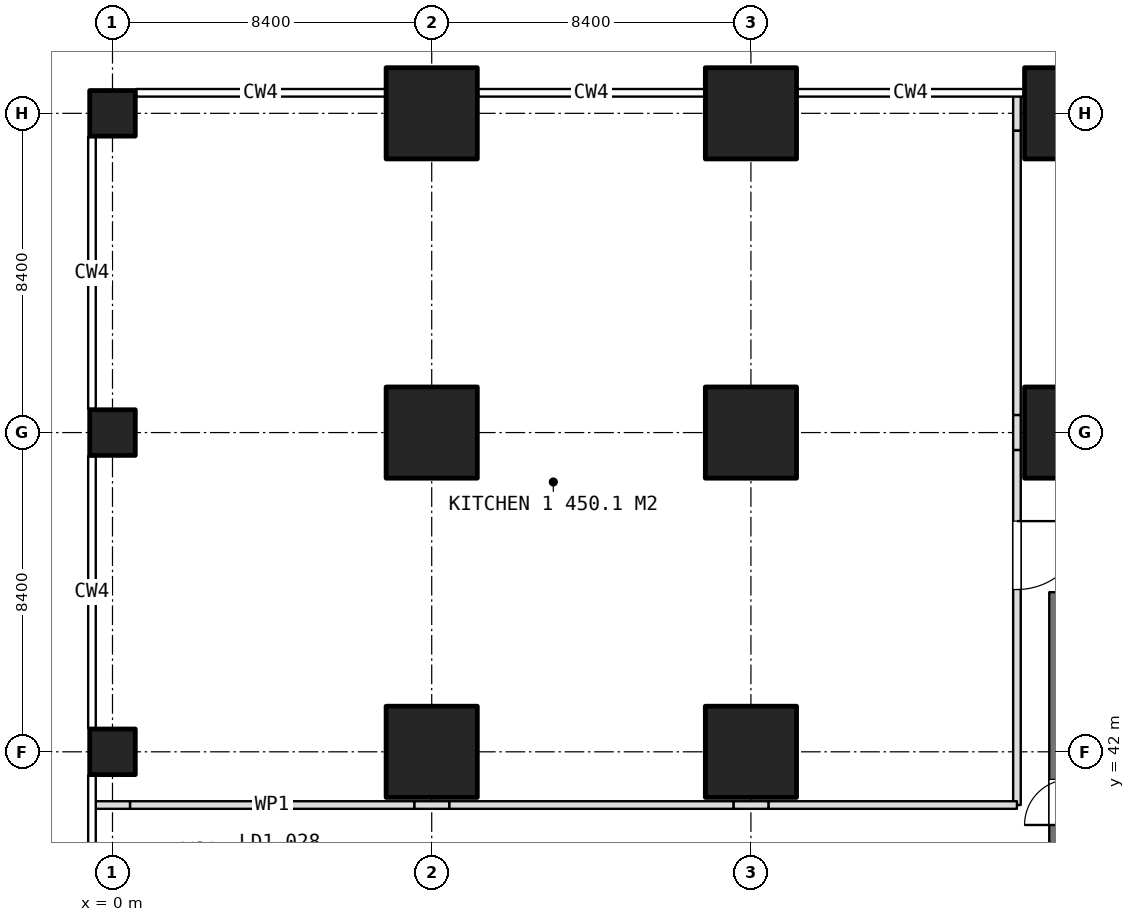
"""IFC4 building model, lengths in metres.
Left out: names, types, materials, properties, quantities, classifications, styles, units other than length and angle.
Written with IfcOpenShell. Run it as: python <this file> out.ifc"""

import sys

from ifc_helpers import new_model, si_unit, direction, frame, frame_2d, origin, origin_2d, place, context, subcontext, project, spatial, rectangle, extrude, element, fill, save


model = new_model("IFC4")
c1 = context("Model", 3, precision=1e-05, world=origin(), true_north=direction((0.0, 1.0)))
c2 = subcontext(c1, "Body", "Model", "MODEL_VIEW")
j1 = project(units=[si_unit("LENGTHUNIT", "METRE"), si_unit("PLANEANGLEUNIT", "RADIAN")], contexts=[c1])
p1 = place(None, origin())
s1 = spatial("IfcSite", under=j1, at=p1, CompositionType="ELEMENT")
p2 = place(p1, origin())
s2 = spatial("IfcBuilding", under=s1, at=p2, CompositionType="ELEMENT")
p3 = place(p2, frame((0.0, 0.0, 15.4)))
s3 = spatial("IfcBuildingStorey", under=s2, at=p3, CompositionType="ELEMENT", Elevation=15.4)
p4 = place(p3, frame((25.2, 21.0, 0.0), z_axis=(0.0, 0.0, 1.0), x_axis=(0.0, 1.0, 0.0)))
e1 = element("IfcWall", 1, at=p4, inside=s3, PredefinedType="SHEAR", context=c2, shape_type="SweptSolid", body=[
    extrude(rectangle(XDim=25.2, YDim=1.1, at=frame_2d((12.6, 0.0))), origin(), (0.0, 0.0, 1.0), 5.0),
])
p5 = place(p4, frame((7.8, 0.0, 0.0)))
e2 = element("IfcOpeningElement", 2, at=p5, cuts=e1, PredefinedType="OPENING", context=c2, shape_type="SweptSolid", body=[
    extrude(rectangle(XDim=1.2, YDim=2.1, at=frame_2d((0.6, 1.05))), frame((0.0, 0.56, 0.0), z_axis=(0.0, -1.0, 0.0), x_axis=(1.0, 0.0, 0.0)), (0.0, 0.0, 1.0), 1.12),
])
p6 = place(p4, frame((14.25, 0.0, 0.0)))
e3 = element("IfcOpeningElement", 3, at=p6, cuts=e1, PredefinedType="OPENING", context=c2, shape_type="SweptSolid", body=[
    extrude(rectangle(XDim=0.9, YDim=2.1, at=frame_2d((0.45, 1.05))), frame((0.0, 0.56, 0.0), z_axis=(0.0, -1.0, 0.0), x_axis=(1.0, 0.0, 0.0)), (0.0, 0.0, 1.0), 1.12),
])
p7 = place(p4, frame((16.85, 0.0, 0.0)))
e4 = element("IfcOpeningElement", 4, at=p7, cuts=e1, PredefinedType="OPENING", context=c2, shape_type="SweptSolid", body=[
    extrude(rectangle(XDim=0.9, YDim=2.1, at=frame_2d((0.45, 1.05))), frame((0.0, 0.56, 0.0), z_axis=(0.0, -1.0, 0.0), x_axis=(1.0, 0.0, 0.0)), (0.0, 0.0, 1.0), 1.12),
])
p8 = place(p4, frame((19.075, 0.0, 0.0)))
e5 = element("IfcOpeningElement", 5, at=p8, cuts=e1, PredefinedType="OPENING", context=c2, shape_type="SweptSolid", body=[
    extrude(rectangle(XDim=1.2, YDim=2.1, at=frame_2d((0.6, 1.05))), frame((0.0, 0.56, 0.0), z_axis=(0.0, -1.0, 0.0), x_axis=(1.0, 0.0, 0.0)), (0.0, 0.0, 1.0), 1.12),
])
for number, where, z_axis, x_axis in (
    (6, (0.0, 42.0, 0.0), (0.0, 0.0, 1.0), (1.0, 0.0, 0.0)),
    (7, (0.0, 50.4, 0.0), (0.0, 0.0, 1.0), (1.0, 0.0, 0.0)),
    (8, (0.0, 58.8, 0.0), (0.0, 0.0, 1.0), (1.0, 0.0, 0.0)),
):
    element("IfcColumn", number, at=place(p3, frame(where, z_axis=z_axis, x_axis=x_axis)), inside=s3, PredefinedType="COLUMN", context=c2, shape_type="SweptSolid", body=[
        extrude(rectangle(XDim=1.2, YDim=1.2, at=origin_2d()), origin(), (0.0, 0.0, 1.0), 5.0),
    ])
for number, where, z_axis, x_axis in (
    (9, (8.4, 42.0, 0.0), (0.0, 0.0, 1.0), (1.0, 0.0, 0.0)),
    (10, (8.4, 50.4, 0.0), (0.0, 0.0, 1.0), (1.0, 0.0, 0.0)),
    (11, (8.4, 58.8, 0.0), (0.0, 0.0, 1.0), (1.0, 0.0, 0.0)),
    (12, (16.8, 42.0, 0.0), (0.0, 0.0, 1.0), (1.0, 0.0, 0.0)),
    (13, (16.8, 50.4, 0.0), (0.0, 0.0, 1.0), (1.0, 0.0, 0.0)),
    (14, (16.8, 58.8, 0.0), (0.0, 0.0, 1.0), (1.0, 0.0, 0.0)),
    (15, (25.2, 50.4, 0.0), (0.0, 0.0, 1.0), (1.0, 0.0, 0.0)),
    (16, (25.2, 58.8, 0.0), (0.0, 0.0, 1.0), (1.0, 0.0, 0.0)),
):
    element("IfcColumn", number, at=place(p3, frame(where, z_axis=z_axis, x_axis=x_axis)), inside=s3, PredefinedType="COLUMN", context=c2, shape_type="SweptSolid", body=[
        extrude(rectangle(XDim=2.4, YDim=2.4, at=origin_2d()), origin(), (0.0, 0.0, 1.0), 5.0),
    ])
p9 = place(p3, frame((23.8, 59.29, 0.0), z_axis=(0.0, 0.0, 1.0), x_axis=(0.0, -1.0, 0.0)))
e17 = element("IfcWall", 17, at=p9, inside=s3, PredefinedType="PARTITIONING", context=c2, shape_type="SweptSolid", body=[
    extrude(rectangle(XDim=0.95, YDim=0.2, at=frame_2d((0.475, 0.0))), origin(), (0.0, 0.0, 1.0), 2.9),
])
p10 = place(p3, frame((23.8, 58.34, 0.0), z_axis=(0.0, 0.0, 1.0), x_axis=(0.0, -1.0, 0.0)))
e18 = element("IfcWall", 18, at=p10, inside=s3, PredefinedType="PARTITIONING", context=c2, shape_type="SweptSolid", body=[
    extrude(rectangle(XDim=7.48, YDim=0.2, at=frame_2d((3.74, 0.0))), origin(), (0.0, 0.0, 1.0), 4.7),
])
p11 = place(p3, frame((23.8, 50.86, 0.0), z_axis=(0.0, 0.0, 1.0), x_axis=(0.0, -1.0, 0.0)))
e19 = element("IfcWall", 19, at=p11, inside=s3, PredefinedType="PARTITIONING", context=c2, shape_type="SweptSolid", body=[
    extrude(rectangle(XDim=0.92, YDim=0.2, at=frame_2d((0.46, 0.0))), origin(), (0.0, 0.0, 1.0), 2.9),
])
p12 = place(p3, frame((23.8, 49.94, 0.0), z_axis=(0.0, 0.0, 1.0), x_axis=(0.0, -1.0, 0.0)))
e20 = element("IfcWall", 20, at=p12, inside=s3, PredefinedType="PARTITIONING", context=c2, shape_type="SweptSolid", body=[
    extrude(rectangle(XDim=9.34, YDim=0.2, at=frame_2d((4.67, 0.0))), origin(), (0.0, 0.0, 1.0), 4.7),
])
p13 = place(p12, frame((1.87, 0.0, 0.0)))
e21 = element("IfcOpeningElement", 21, at=p13, cuts=e20, PredefinedType="OPENING", context=c2, shape_type="SweptSolid", body=[
    extrude(rectangle(XDim=1.8, YDim=2.1, at=frame_2d((0.9, 1.05))), frame((0.0, 0.11, 0.0), z_axis=(0.0, -1.0, 0.0), x_axis=(1.0, 0.0, 0.0)), (0.0, 0.0, 1.0), 0.22),
])
p14 = place(p3, frame((23.8, 40.6, 0.0), z_axis=(0.0, 0.0, 1.0), x_axis=(-1.0, 0.0, 0.0)))
e22 = element("IfcWall", 22, at=p14, inside=s3, PredefinedType="PARTITIONING", context=c2, shape_type="SweptSolid", body=[
    extrude(rectangle(XDim=6.54, YDim=0.2, at=frame_2d((3.27, 0.0))), origin(), (0.0, 0.0, 1.0), 4.7),
])
p15 = place(p3, frame((17.26, 40.6, 0.0), z_axis=(0.0, 0.0, 1.0), x_axis=(-1.0, 0.0, 0.0)))
e23 = element("IfcWall", 23, at=p15, inside=s3, PredefinedType="PARTITIONING", context=c2, shape_type="SweptSolid", body=[
    extrude(rectangle(XDim=0.92, YDim=0.2, at=frame_2d((0.46, 0.0))), origin(), (0.0, 0.0, 1.0), 2.9),
])
p16 = place(p3, frame((16.34, 40.6, 0.0), z_axis=(0.0, 0.0, 1.0), x_axis=(-1.0, 0.0, 0.0)))
e24 = element("IfcWall", 24, at=p16, inside=s3, PredefinedType="PARTITIONING", context=c2, shape_type="SweptSolid", body=[
    extrude(rectangle(XDim=7.48, YDim=0.2, at=frame_2d((3.74, 0.0))), origin(), (0.0, 0.0, 1.0), 4.7),
])
p17 = place(p3, frame((8.86, 40.6, 0.0), z_axis=(0.0, 0.0, 1.0), x_axis=(-1.0, 0.0, 0.0)))
e25 = element("IfcWall", 25, at=p17, inside=s3, PredefinedType="PARTITIONING", context=c2, shape_type="SweptSolid", body=[
    extrude(rectangle(XDim=0.92, YDim=0.2, at=frame_2d((0.46, 0.0))), origin(), (0.0, 0.0, 1.0), 2.9),
])
p18 = place(p3, frame((7.94, 40.6, 0.0), z_axis=(0.0, 0.0, 1.0), x_axis=(-1.0, 0.0, 0.0)))
e26 = element("IfcWall", 26, at=p18, inside=s3, PredefinedType="PARTITIONING", context=c2, shape_type="SweptSolid", body=[
    extrude(rectangle(XDim=7.48, YDim=0.2, at=frame_2d((3.74, 0.0))), origin(), (0.0, 0.0, 1.0), 4.7),
])
p19 = place(p3, frame((0.46, 40.6, 0.0), z_axis=(0.0, 0.0, 1.0), x_axis=(-1.0, 0.0, 0.0)))
e27 = element("IfcWall", 27, at=p19, inside=s3, PredefinedType="PARTITIONING", context=c2, shape_type="SweptSolid", body=[
    extrude(rectangle(XDim=0.95, YDim=0.2, at=frame_2d((0.475, 0.0))), origin(), (0.0, 0.0, 1.0), 2.9),
])
p20 = place(p13, origin())
e28 = element("IfcDoor", 28, at=p20, inside=s3, OperationType="DOUBLE_DOOR_SINGLE_SWING", PredefinedType="DOOR", context=c2, shape_type="SweptSolid", body=[
    extrude(rectangle(XDim=1.8, YDim=2.1, at=frame_2d((0.9, 1.05))), frame((0.0, 0.025, 0.0), z_axis=(0.0, -1.0, 0.0), x_axis=(1.0, 0.0, 0.0)), (0.0, 0.0, 1.0), 0.05),
])
fill(e21, e28)
save(model, sys.argv[1])
